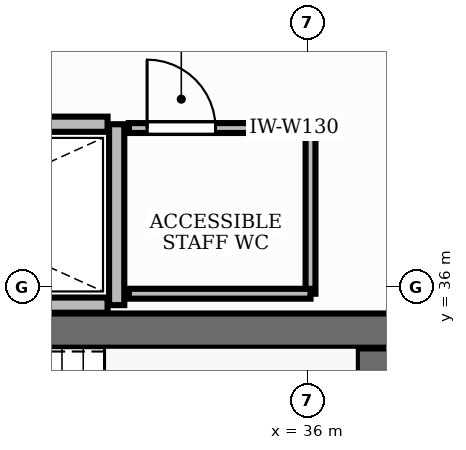
"""IFC4 building model, lengths in metres.
Left out: names, types, materials, properties, quantities, classifications, styles, units other than length and angle.
Written with IfcOpenShell. Run it as: python <this file> out.ifc"""

import sys

from ifc_helpers import new_model, si_unit, direction, frame, frame_2d, origin, place, context, subcontext, project, spatial, rectangle, extrude, element, fill, save


model = new_model("IFC4")
c1 = context("Model", 3, precision=1e-05, world=origin(), true_north=direction((0.0, 1.0)))
c2 = subcontext(c1, "Body", "Model", "MODEL_VIEW")
j1 = project(units=[si_unit("LENGTHUNIT", "METRE"), si_unit("PLANEANGLEUNIT", "RADIAN")], contexts=[c1])
p1 = place(None, origin())
s1 = spatial("IfcSite", under=j1, at=p1, CompositionType="ELEMENT")
p2 = place(p1, origin())
s2 = spatial("IfcBuilding", under=s1, at=p2, CompositionType="ELEMENT")
p3 = place(p2, frame((0.0, 0.0, 63.6)))
s3 = spatial("IfcBuildingStorey", under=s2, at=p3, CompositionType="ELEMENT", Elevation=63.6)
p4 = place(p3, frame((28.852, 35.425, 0.0), z_axis=(0.0, 0.0, 1.0), x_axis=(1.0, 0.0, 0.0)))
e1 = element("IfcWall", 1, at=p4, inside=s3, PredefinedType="SHEAR", context=c2, shape_type="SweptSolid", body=[
    extrude(rectangle(XDim=8.248, YDim=0.45, at=frame_2d((4.124, 0.0))), origin(), (0.0, 0.0, 1.0), 3.9),
])
p5 = place(p3, frame((36.875, 32.11, 0.0), z_axis=(0.0, 0.0, 1.0), x_axis=(0.0, 1.0, 0.0)))
e2 = element("IfcWall", 2, at=p5, inside=s3, PredefinedType="SHEAR", context=c2, shape_type="SweptSolid", body=[
    extrude(rectangle(XDim=3.08, YDim=0.45, at=frame_2d((1.54, 0.0))), origin(), (0.0, 0.0, 1.0), 3.9),
])
p6 = place(p3, frame((33.49, 35.76, 0.0), z_axis=(0.0, 0.0, 1.0), x_axis=(0.0, 1.0, 0.0)))
e3 = element("IfcWall", 3, at=p6, inside=s3, PredefinedType="PARTITIONING", context=c2, shape_type="SweptSolid", body=[
    extrude(rectangle(XDim=2.38, YDim=0.2, at=frame_2d((1.19, 0.0))), origin(), (0.0, 0.0, 1.0), 2.91),
])
for number, where, z_axis, x_axis in (
    (4, (28.8, 35.76, 0.0), (0.0, 0.0, 1.0), (1.0, 0.0, 0.0)),
    (5, (28.8, 38.14, 0.0), (0.0, 0.0, 1.0), (1.0, 0.0, 0.0)),
):
    element("IfcWall", number, at=place(p3, frame(where, z_axis=z_axis, x_axis=x_axis)), inside=s3, PredefinedType="PARTITIONING", context=c2, shape_type="SweptSolid", body=[
        extrude(rectangle(XDim=4.57, YDim=0.2, at=frame_2d((2.285, 0.0))), origin(), (0.0, 0.0, 1.0), 2.91),
    ])
p7 = place(p3, frame((33.65, 38.09, 0.0), z_axis=(0.0, 0.0, 1.0), x_axis=(0.999999994783, -0.000102145045, 0.0)))
e6 = element("IfcWall", 6, at=p7, inside=s3, PredefinedType="PARTITIONING", context=c2, shape_type="SweptSolid", body=[
    extrude(rectangle(XDim=2.39, YDim=0.13, at=frame_2d((1.195, 0.0))), origin(), (0.0, 0.0, 1.0), 2.91),
])
p8 = place(p7, frame((0.24, 0.0, 0.0)))
e7 = element("IfcOpeningElement", 7, at=p8, cuts=e6, PredefinedType="OPENING", context=c2, shape_type="SweptSolid", body=[
    extrude(rectangle(XDim=0.9, YDim=2.15, at=frame_2d((0.45, 1.075))), frame((0.0, 0.08, 0.0), z_axis=(0.0, -1.0, 0.0), x_axis=(1.0, 0.0, 0.0)), (0.0, 0.0, 1.0), 0.16),
])
p9 = place(p3, frame((36.04, 38.09, 0.0), z_axis=(0.0, 0.0, 1.0), x_axis=(0.0, -1.0, 0.0)))
e8 = element("IfcWall", 8, at=p9, inside=s3, PredefinedType="PARTITIONING", context=c2, shape_type="SweptSolid", body=[
    extrude(rectangle(XDim=2.18, YDim=0.13, at=frame_2d((1.09, 0.0))), origin(), (0.0, 0.0, 1.0), 2.91),
])
p10 = place(p3, frame((36.04, 35.91, 0.0), z_axis=(0.0, 0.0, 1.0), x_axis=(-1.0, 0.0, 0.0)))
e9 = element("IfcWall", 9, at=p10, inside=s3, PredefinedType="PARTITIONING", context=c2, shape_type="SweptSolid", body=[
    extrude(rectangle(XDim=2.39, YDim=0.13, at=frame_2d((1.195, 0.0))), origin(), (0.0, 0.0, 1.0), 2.91),
])
p11 = place(p8, origin())
e10 = element("IfcDoor", 10, at=p11, inside=s3, OperationType="SINGLE_SWING_LEFT", PredefinedType="DOOR", context=c2, shape_type="SweptSolid", body=[
    extrude(rectangle(XDim=0.9, YDim=2.15, at=frame_2d((0.45, 1.075))), frame((0.0, 0.025, 0.0), z_axis=(0.0, -1.0, 0.0), x_axis=(1.0, 0.0, 0.0)), (0.0, 0.0, 1.0), 0.05),
])
fill(e7, e10)
save(model, sys.argv[1])
